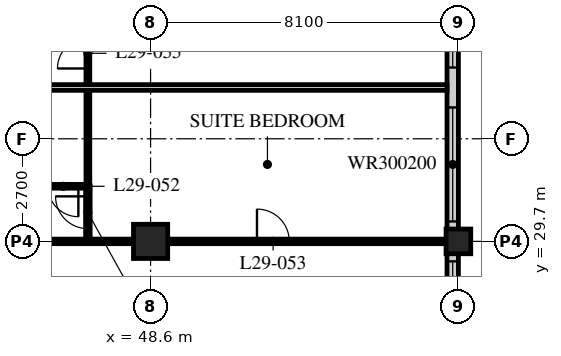
"""IFC4 building model, lengths in metres.
Left out: names, types, materials, properties, quantities, classifications, styles, units other than length and angle.
Written with IfcOpenShell. Run it as: python <this file> out.ifc"""

import sys

from ifc_helpers import new_model, si_unit, direction, frame, frame_2d, origin, origin_2d, place, context, subcontext, project, spatial, rectangle, hollow_rectangle, extrude, element, fill, save


model = new_model("IFC4")
c1 = context("Model", 3, precision=1e-05, world=origin(), true_north=direction((0.0, 1.0)))
c2 = subcontext(c1, "Body", "Model", "MODEL_VIEW")
j1 = project(units=[si_unit("LENGTHUNIT", "METRE"), si_unit("PLANEANGLEUNIT", "RADIAN")], contexts=[c1])
p1 = place(None, origin())
s1 = spatial("IfcSite", under=j1, at=p1, CompositionType="ELEMENT")
p2 = place(p1, origin())
s2 = spatial("IfcBuilding", under=s1, at=p2, CompositionType="ELEMENT")
p3 = place(p2, frame((0.0, 0.0, 117.0)))
s3 = spatial("IfcBuildingStorey", under=s2, at=p3, CompositionType="ELEMENT", Elevation=117.0)
p4 = place(p3, frame((48.6, 29.7, 0.0), z_axis=(0.0, 0.0, 1.0), x_axis=(1.0, 0.0, 0.0)))
e1 = element("IfcColumn", 1, at=p4, inside=s3, PredefinedType="COLUMN", context=c2, shape_type="SweptSolid", body=[
    extrude(hollow_rectangle(XDim=0.9, YDim=0.9, WallThickness=0.09, at=origin_2d()), origin(), (0.0, 0.0, 1.0), 3.4),
])
p5 = place(p3, frame((56.7, 29.7, 0.0), z_axis=(0.0, 0.0, 1.0), x_axis=(1.0, 0.0, 0.0)))
e2 = element("IfcColumn", 2, at=p5, inside=s3, PredefinedType="COLUMN", context=c2, shape_type="SweptSolid", body=[
    extrude(hollow_rectangle(XDim=0.65, YDim=0.65, WallThickness=0.055, at=origin_2d()), origin(), (0.0, 0.0, 1.0), 3.4),
])
p6 = place(p3, frame((56.55, 13.8, 0.0), z_axis=(0.0, 0.0, 1.0), x_axis=(0.0, 1.0, 0.0)))
e3 = element("IfcWall", 3, at=p6, inside=s3, PredefinedType="SOLIDWALL", context=c2, shape_type="SweptSolid", body=[
    extrude(rectangle(XDim=32.1, YDim=0.3, at=frame_2d((16.05, 0.0))), origin(), (0.0, 0.0, 1.0), 3.19),
])
p7 = place(p6, frame((0.225, 0.0, 0.9)))
e4 = element("IfcOpeningElement", 4, at=p7, cuts=e3, PredefinedType="OPENING", context=c2, shape_type="SweptSolid", body=[
    extrude(rectangle(XDim=3.0, YDim=2.0, at=frame_2d((1.5, 1.0))), frame((0.0, 0.16, 0.0), z_axis=(0.0, -1.0, 0.0), x_axis=(1.0, 0.0, 0.0)), (0.0, 0.0, 1.0), 0.32),
])
p8 = place(p6, frame((4.275, 0.0, 0.9)))
e5 = element("IfcOpeningElement", 5, at=p8, cuts=e3, PredefinedType="OPENING", context=c2, shape_type="SweptSolid", body=[
    extrude(rectangle(XDim=3.0, YDim=2.0, at=frame_2d((1.5, 1.0))), frame((0.0, 0.16, 0.0), z_axis=(0.0, -1.0, 0.0), x_axis=(1.0, 0.0, 0.0)), (0.0, 0.0, 1.0), 0.32),
])
p9 = place(p6, frame((8.325, 0.0, 0.9)))
e6 = element("IfcOpeningElement", 6, at=p9, cuts=e3, PredefinedType="OPENING", context=c2, shape_type="SweptSolid", body=[
    extrude(rectangle(XDim=3.0, YDim=2.0, at=frame_2d((1.5, 1.0))), frame((0.0, 0.16, 0.0), z_axis=(0.0, -1.0, 0.0), x_axis=(1.0, 0.0, 0.0)), (0.0, 0.0, 1.0), 0.32),
])
p10 = place(p6, frame((12.375, 0.0, 0.9)))
e7 = element("IfcOpeningElement", 7, at=p10, cuts=e3, PredefinedType="OPENING", context=c2, shape_type="SweptSolid", body=[
    extrude(rectangle(XDim=3.0, YDim=2.0, at=frame_2d((1.5, 1.0))), frame((0.0, 0.16, 0.0), z_axis=(0.0, -1.0, 0.0), x_axis=(1.0, 0.0, 0.0)), (0.0, 0.0, 1.0), 0.32),
])
p11 = place(p6, frame((16.425, 0.0, 0.9)))
e8 = element("IfcOpeningElement", 8, at=p11, cuts=e3, PredefinedType="OPENING", context=c2, shape_type="SweptSolid", body=[
    extrude(rectangle(XDim=3.0, YDim=2.0, at=frame_2d((1.5, 1.0))), frame((0.0, 0.16, 0.0), z_axis=(0.0, -1.0, 0.0), x_axis=(1.0, 0.0, 0.0)), (0.0, 0.0, 1.0), 0.32),
])
p12 = place(p6, frame((20.475, 0.0, 0.9)))
e9 = element("IfcOpeningElement", 9, at=p12, cuts=e3, PredefinedType="OPENING", context=c2, shape_type="SweptSolid", body=[
    extrude(rectangle(XDim=3.0, YDim=2.0, at=frame_2d((1.5, 1.0))), frame((0.0, 0.16, 0.0), z_axis=(0.0, -1.0, 0.0), x_axis=(1.0, 0.0, 0.0)), (0.0, 0.0, 1.0), 0.32),
])
p13 = place(p6, frame((24.525, 0.0, 0.9)))
e10 = element("IfcOpeningElement", 10, at=p13, cuts=e3, PredefinedType="OPENING", context=c2, shape_type="SweptSolid", body=[
    extrude(rectangle(XDim=3.0, YDim=2.0, at=frame_2d((1.5, 1.0))), frame((0.0, 0.16, 0.0), z_axis=(0.0, -1.0, 0.0), x_axis=(1.0, 0.0, 0.0)), (0.0, 0.0, 1.0), 0.32),
])
p14 = place(p6, frame((28.575, 0.0, 0.9)))
e11 = element("IfcOpeningElement", 11, at=p14, cuts=e3, PredefinedType="OPENING", context=c2, shape_type="SweptSolid", body=[
    extrude(rectangle(XDim=3.0, YDim=2.0, at=frame_2d((1.5, 1.0))), frame((0.0, 0.16, 0.0), z_axis=(0.0, -1.0, 0.0), x_axis=(1.0, 0.0, 0.0)), (0.0, 0.0, 1.0), 0.32),
])
p15 = place(p3, frame((46.95, 31.15, 0.0), z_axis=(0.0, 0.0, 1.0), x_axis=(0.0, 1.0, 0.0)))
e12 = element("IfcWall", 12, at=p15, inside=s3, PredefinedType="PARTITIONING", context=c2, shape_type="SweptSolid", body=[
    extrude(rectangle(XDim=4.4, YDim=0.1, at=frame_2d((2.2, 0.0))), origin(), (0.0, 0.0, 1.0), 3.19),
])
p16 = place(p15, frame((3.1, 0.0, 0.0)))
e13 = element("IfcOpeningElement", 13, at=p16, cuts=e12, PredefinedType="OPENING", context=c2, shape_type="SweptSolid", body=[
    extrude(rectangle(XDim=0.8, YDim=2.1, at=frame_2d((0.4, 1.05))), frame((0.0, 0.06, 0.0), z_axis=(0.0, -1.0, 0.0), x_axis=(1.0, 0.0, 0.0)), (0.0, 0.0, 1.0), 0.12),
])
p17 = place(p3, frame((44.55, 31.15, 0.0), z_axis=(0.0, 0.0, 1.0), x_axis=(1.0, 0.0, 0.0)))
e14 = element("IfcWall", 14, at=p17, inside=s3, PredefinedType="PARTITIONING", context=c2, shape_type="SweptSolid", body=[
    extrude(rectangle(XDim=2.4, YDim=0.1, at=frame_2d((1.2, 0.0))), origin(), (0.0, 0.0, 1.0), 3.19),
])
p18 = place(p17, frame((1.35, 0.0, 0.0)))
e15 = element("IfcOpeningElement", 15, at=p18, cuts=e14, PredefinedType="OPENING", context=c2, shape_type="SweptSolid", body=[
    extrude(rectangle(XDim=0.8, YDim=2.1, at=frame_2d((0.4, 1.05))), frame((0.0, 0.06, 0.0), z_axis=(0.0, -1.0, 0.0), x_axis=(1.0, 0.0, 0.0)), (0.0, 0.0, 1.0), 0.12),
])
p19 = place(p3, frame((44.55, 29.7, 0.0), z_axis=(0.0, 0.0, 1.0), x_axis=(1.0, 0.0, 0.0)))
e16 = element("IfcWall", 16, at=p19, inside=s3, PredefinedType="PARTITIONING", context=c2, shape_type="SweptSolid", body=[
    extrude(rectangle(XDim=11.85, YDim=0.12, at=frame_2d((5.925, 0.0))), origin(), (0.0, 0.0, 1.0), 2.578),
])
p20 = place(p19, frame((6.85, 0.0, 0.0)))
e17 = element("IfcOpeningElement", 17, at=p20, cuts=e16, PredefinedType="OPENING", context=c2, shape_type="SweptSolid", body=[
    extrude(rectangle(XDim=0.85, YDim=2.1, at=frame_2d((0.425, 1.05))), frame((0.0, 0.07, 0.0), z_axis=(0.0, -1.0, 0.0), x_axis=(1.0, 0.0, 0.0)), (0.0, 0.0, 1.0), 0.14),
])
p21 = place(p3, frame((44.55, 33.75, 0.0), z_axis=(0.0, 0.0, 1.0), x_axis=(1.0, 0.0, 0.0)))
e18 = element("IfcWall", 18, at=p21, inside=s3, PredefinedType="PARTITIONING", context=c2, shape_type="SweptSolid", body=[
    extrude(rectangle(XDim=11.85, YDim=0.15, at=frame_2d((5.925, 0.0))), origin(), (0.0, 0.0, 1.0), 3.19),
])
p22 = place(p3, frame((46.95, 31.16, 0.0), z_axis=(0.0, 0.0, 1.0), x_axis=(0.0, -1.0, 0.0)))
e19 = element("IfcWall", 19, at=p22, inside=s3, PredefinedType="PARTITIONING", context=c2, shape_type="SweptSolid", body=[
    extrude(rectangle(XDim=1.46, YDim=0.12, at=frame_2d((0.73, 0.0))), origin(), (0.0, 0.0, 1.0), 3.19),
])
p23 = place(p22, frame((0.275, 0.0, 0.0)))
e20 = element("IfcOpeningElement", 20, at=p23, cuts=e19, PredefinedType="OPENING", context=c2, shape_type="SweptSolid", body=[
    extrude(rectangle(XDim=0.85, YDim=2.1, at=frame_2d((0.425, 1.05))), frame((0.0, 0.07, 0.0), z_axis=(0.0, -1.0, 0.0), x_axis=(1.0, 0.0, 0.0)), (0.0, 0.0, 1.0), 0.14),
])
p24 = place(p10, origin())
e21 = element("IfcWindow", 21, at=p24, inside=s3, PartitioningType="SINGLE_PANEL", PredefinedType="WINDOW", context=c2, shape_type="SweptSolid", body=[
    extrude(rectangle(XDim=3.0, YDim=2.0, at=frame_2d((1.5, 1.0))), frame((0.0, 0.03, 0.0), z_axis=(0.0, -1.0, 0.0), x_axis=(1.0, 0.0, 0.0)), (0.0, 0.0, 1.0), 0.06),
])
fill(e7, e21)
p25 = place(p11, origin())
e22 = element("IfcWindow", 22, at=p25, inside=s3, PartitioningType="SINGLE_PANEL", PredefinedType="WINDOW", context=c2, shape_type="SweptSolid", body=[
    extrude(rectangle(XDim=3.0, YDim=2.0, at=frame_2d((1.5, 1.0))), frame((0.0, 0.03, 0.0), z_axis=(0.0, -1.0, 0.0), x_axis=(1.0, 0.0, 0.0)), (0.0, 0.0, 1.0), 0.06),
])
fill(e8, e22)
p26 = place(p12, origin())
e23 = element("IfcWindow", 23, at=p26, inside=s3, PartitioningType="SINGLE_PANEL", PredefinedType="WINDOW", context=c2, shape_type="SweptSolid", body=[
    extrude(rectangle(XDim=3.0, YDim=2.0, at=frame_2d((1.5, 1.0))), frame((0.0, 0.03, 0.0), z_axis=(0.0, -1.0, 0.0), x_axis=(1.0, 0.0, 0.0)), (0.0, 0.0, 1.0), 0.06),
])
fill(e9, e23)
p27 = place(p18, origin())
e24 = element("IfcDoor", 24, at=p27, inside=s3, OperationType="SINGLE_SWING_LEFT", PredefinedType="DOOR", context=c2, shape_type="SweptSolid", body=[
    extrude(rectangle(XDim=0.8, YDim=2.1, at=frame_2d((0.4, 1.05))), frame((0.0, 0.025, 0.0), z_axis=(0.0, -1.0, 0.0), x_axis=(1.0, 0.0, 0.0)), (0.0, 0.0, 1.0), 0.05),
])
fill(e15, e24)
p28 = place(p20, origin())
e25 = element("IfcDoor", 25, at=p28, inside=s3, OperationType="SINGLE_SWING_LEFT", PredefinedType="DOOR", context=c2, shape_type="SweptSolid", body=[
    extrude(rectangle(XDim=0.85, YDim=2.1, at=frame_2d((0.425, 1.05))), frame((0.0, 0.025, 0.0), z_axis=(0.0, -1.0, 0.0), x_axis=(1.0, 0.0, 0.0)), (0.0, 0.0, 1.0), 0.05),
])
fill(e17, e25)
p29 = place(p16, origin())
e26 = element("IfcDoor", 26, at=p29, inside=s3, OperationType="SINGLE_SWING_LEFT", PredefinedType="DOOR", context=c2, shape_type="SweptSolid", body=[
    extrude(rectangle(XDim=0.8, YDim=2.1, at=frame_2d((0.4, 1.05))), frame((0.0, 0.025, 0.0), z_axis=(0.0, -1.0, 0.0), x_axis=(1.0, 0.0, 0.0)), (0.0, 0.0, 1.0), 0.05),
])
fill(e13, e26)
p30 = place(p23, origin())
e27 = element("IfcDoor", 27, at=p30, inside=s3, OperationType="SINGLE_SWING_RIGHT", PredefinedType="DOOR", context=c2, shape_type="SweptSolid", body=[
    extrude(rectangle(XDim=0.85, YDim=2.1, at=frame_2d((0.425, 1.05))), frame((0.0, 0.025, 0.0), z_axis=(0.0, -1.0, 0.0), x_axis=(1.0, 0.0, 0.0)), (0.0, 0.0, 1.0), 0.05),
])
fill(e20, e27)
save(model, sys.argv[1])
